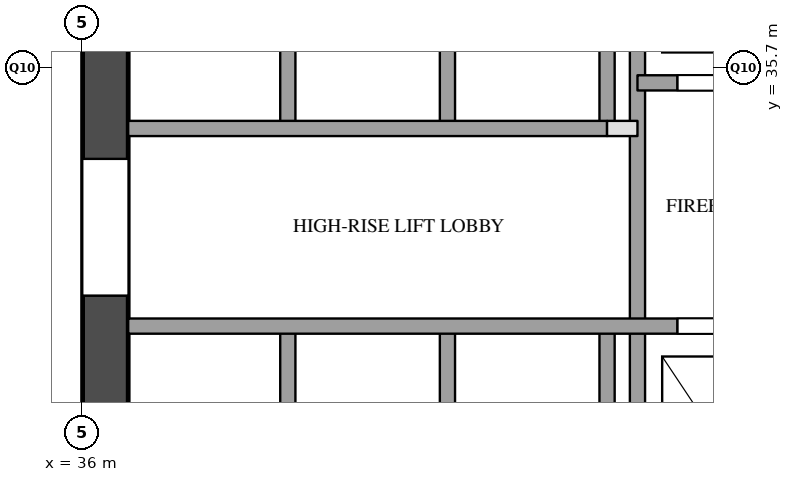
"""IFC4 building model, lengths in metres.
Left out: names, types, materials, properties, quantities, classifications, styles, units other than length and angle.
Written with IfcOpenShell. Run it as: python <this file> out.ifc"""

import sys

from ifc_helpers import new_model, si_unit, direction, frame, frame_2d, origin, place, context, subcontext, project, spatial, rectangle, extrude, element, fill, save


model = new_model("IFC4")
c1 = context("Model", 3, precision=1e-05, world=origin(), true_north=direction((0.0, 1.0)))
c2 = subcontext(c1, "Body", "Model", "MODEL_VIEW")
j1 = project(units=[si_unit("LENGTHUNIT", "METRE"), si_unit("PLANEANGLEUNIT", "RADIAN")], contexts=[c1])
p1 = place(None, origin())
s1 = spatial("IfcSite", under=j1, at=p1, CompositionType="ELEMENT")
p2 = place(p1, origin())
s2 = spatial("IfcBuilding", under=s1, at=p2, CompositionType="ELEMENT")
p3 = place(p2, frame((0.0, 0.0, 31.0)))
s3 = spatial("IfcBuildingStorey", under=s2, at=p3, CompositionType="ELEMENT", Elevation=31.0)
p4 = place(p3, frame((36.3, 29.1, 0.0), z_axis=(0.0, 0.0, 1.0), x_axis=(0.0, 1.0, 0.0)))
e1 = element("IfcWall", 1, at=p4, inside=s3, PredefinedType="SHEAR", context=c2, shape_type="SweptSolid", body=[
    extrude(rectangle(XDim=20.3, YDim=0.6, at=frame_2d((10.15, 0.0))), origin(), (0.0, 0.0, 1.0), 3.5),
])
p5 = place(p4, frame((3.6, 0.0, 0.0)))
e2 = element("IfcOpeningElement", 2, at=p5, cuts=e1, PredefinedType="OPENING", context=c2, shape_type="SweptSolid", body=[
    extrude(rectangle(XDim=1.8, YDim=2.1, at=frame_2d((0.9, 1.05))), frame((0.0, 0.31, 0.0), z_axis=(0.0, -1.0, 0.0), x_axis=(1.0, 0.0, 0.0)), (0.0, 0.0, 1.0), 0.62),
])
p6 = place(p4, frame((16.4, 0.0, 0.0)))
e3 = element("IfcOpeningElement", 3, at=p6, cuts=e1, PredefinedType="OPENING", context=c2, shape_type="SweptSolid", body=[
    extrude(rectangle(XDim=1.0, YDim=2.1, at=frame_2d((0.5, 1.05))), frame((0.0, 0.31, 0.0), z_axis=(0.0, -1.0, 0.0), x_axis=(1.0, 0.0, 0.0)), (0.0, 0.0, 1.0), 0.62),
])
p7 = place(p3, frame((38.7, 29.1, 0.0), z_axis=(0.0, 0.0, 1.0), x_axis=(0.0, 1.0, 0.0)))
e4 = element("IfcWall", 4, at=p7, inside=s3, PredefinedType="SOLIDWALL", context=c2, shape_type="SweptSolid", body=[
    extrude(rectangle(XDim=3.2, YDim=0.2, at=frame_2d((1.6, 0.0))), origin(), (0.0, 0.0, 1.0), 3.5),
])
p8 = place(p3, frame((38.7, 34.9, 0.0), z_axis=(0.0, 0.0, 1.0), x_axis=(0.0, 1.0, 0.0)))
e5 = element("IfcWall", 5, at=p8, inside=s3, PredefinedType="SOLIDWALL", context=c2, shape_type="SweptSolid", body=[
    extrude(rectangle(XDim=3.2, YDim=0.2, at=frame_2d((1.6, 0.0))), origin(), (0.0, 0.0, 1.0), 3.5),
])
p9 = place(p3, frame((40.8, 29.1, 0.0), z_axis=(0.0, 0.0, 1.0), x_axis=(0.0, 1.0, 0.0)))
e6 = element("IfcWall", 6, at=p9, inside=s3, PredefinedType="SOLIDWALL", context=c2, shape_type="SweptSolid", body=[
    extrude(rectangle(XDim=3.2, YDim=0.2, at=frame_2d((1.6, 0.0))), origin(), (0.0, 0.0, 1.0), 3.5),
])
p10 = place(p3, frame((40.8, 34.9, 0.0), z_axis=(0.0, 0.0, 1.0), x_axis=(0.0, 1.0, 0.0)))
e7 = element("IfcWall", 7, at=p10, inside=s3, PredefinedType="SOLIDWALL", context=c2, shape_type="SweptSolid", body=[
    extrude(rectangle(XDim=3.2, YDim=0.2, at=frame_2d((1.6, 0.0))), origin(), (0.0, 0.0, 1.0), 3.5),
])
p11 = place(p3, frame((42.9, 29.1, 0.0), z_axis=(0.0, 0.0, 1.0), x_axis=(0.0, 1.0, 0.0)))
e8 = element("IfcWall", 8, at=p11, inside=s3, PredefinedType="SOLIDWALL", context=c2, shape_type="SweptSolid", body=[
    extrude(rectangle(XDim=3.2, YDim=0.2, at=frame_2d((1.6, 0.0))), origin(), (0.0, 0.0, 1.0), 3.5),
])
p12 = place(p3, frame((42.9, 34.9, 0.0), z_axis=(0.0, 0.0, 1.0), x_axis=(0.0, 1.0, 0.0)))
e9 = element("IfcWall", 9, at=p12, inside=s3, PredefinedType="SOLIDWALL", context=c2, shape_type="SweptSolid", body=[
    extrude(rectangle(XDim=3.2, YDim=0.2, at=frame_2d((1.6, 0.0))), origin(), (0.0, 0.0, 1.0), 3.5),
])
p13 = place(p3, frame((43.3, 29.1, 0.0), z_axis=(0.0, 0.0, 1.0), x_axis=(0.0, 1.0, 0.0)))
e10 = element("IfcWall", 10, at=p13, inside=s3, PredefinedType="SOLIDWALL", context=c2, shape_type="SweptSolid", body=[
    extrude(rectangle(XDim=9.9, YDim=0.2, at=frame_2d((4.95, 0.0))), origin(), (0.0, 0.0, 1.0), 3.5),
])
p14 = place(p3, frame((36.6, 32.3, 0.0), z_axis=(0.0, 0.0, 1.0), x_axis=(1.0, 0.0, 0.0)))
e11 = element("IfcWall", 11, at=p14, inside=s3, PredefinedType="SOLIDWALL", context=c2, shape_type="SweptSolid", body=[
    extrude(rectangle(XDim=11.2, YDim=0.2, at=frame_2d((5.6, 0.0))), origin(), (0.0, 0.0, 1.0), 3.5),
])
p15 = place(p14, frame((7.225, 0.0, 0.0)))
e12 = element("IfcOpeningElement", 12, at=p15, cuts=e11, PredefinedType="OPENING", context=c2, shape_type="SweptSolid", body=[
    extrude(rectangle(XDim=1.2, YDim=2.1, at=frame_2d((0.6, 1.05))), frame((0.0, 0.11, 0.0), z_axis=(0.0, -1.0, 0.0), x_axis=(1.0, 0.0, 0.0)), (0.0, 0.0, 1.0), 0.22),
])
p16 = place(p14, frame((9.475, 0.0, 0.0)))
e13 = element("IfcOpeningElement", 13, at=p16, cuts=e11, PredefinedType="OPENING", context=c2, shape_type="SweptSolid", body=[
    extrude(rectangle(XDim=1.2, YDim=2.1, at=frame_2d((0.6, 1.05))), frame((0.0, 0.11, 0.0), z_axis=(0.0, -1.0, 0.0), x_axis=(1.0, 0.0, 0.0)), (0.0, 0.0, 1.0), 0.22),
])
p17 = place(p3, frame((42.9, 34.9, 0.0), z_axis=(0.0, 0.0, 1.0), x_axis=(1.0, 0.0, 0.0)))
e14 = element("IfcWall", 14, at=p17, inside=s3, PredefinedType="PARTITIONING", context=c2, shape_type="SweptSolid", body=[
    extrude(rectangle(XDim=0.4, YDim=0.2, at=frame_2d((0.2, 0.0))), origin(), (0.0, 0.0, 1.0), 3.5),
])
p18 = place(p3, frame((36.6, 34.9, 0.0), z_axis=(0.0, 0.0, 1.0), x_axis=(1.0, 0.0, 0.0)))
e15 = element("IfcWall", 15, at=p18, inside=s3, PredefinedType="SOLIDWALL", context=c2, shape_type="SweptSolid", body=[
    extrude(rectangle(XDim=6.3, YDim=0.2, at=frame_2d((3.15, 0.0))), origin(), (0.0, 0.0, 1.0), 3.5),
])
p19 = place(p3, frame((43.3, 35.5, 0.0), z_axis=(0.0, 0.0, 1.0), x_axis=(1.0, 0.0, 0.0)))
e16 = element("IfcWall", 16, at=p19, inside=s3, PredefinedType="SOLIDWALL", context=c2, shape_type="SweptSolid", body=[
    extrude(rectangle(XDim=4.5, YDim=0.2, at=frame_2d((2.25, 0.0))), origin(), (0.0, 0.0, 1.0), 3.5),
])
p20 = place(p19, frame((0.525, 0.0, 0.0)))
e17 = element("IfcOpeningElement", 17, at=p20, cuts=e16, PredefinedType="OPENING", context=c2, shape_type="SweptSolid", body=[
    extrude(rectangle(XDim=1.2, YDim=2.1, at=frame_2d((0.6, 1.05))), frame((0.0, 0.11, 0.0), z_axis=(0.0, -1.0, 0.0), x_axis=(1.0, 0.0, 0.0)), (0.0, 0.0, 1.0), 0.22),
])
p21 = place(p19, frame((3.025, 0.0, 0.0)))
e18 = element("IfcOpeningElement", 18, at=p21, cuts=e16, PredefinedType="OPENING", context=c2, shape_type="SweptSolid", body=[
    extrude(rectangle(XDim=0.7, YDim=2.1, at=frame_2d((0.35, 1.05))), frame((0.0, 0.11, 0.0), z_axis=(0.0, -1.0, 0.0), x_axis=(1.0, 0.0, 0.0)), (0.0, 0.0, 1.0), 0.22),
])
p22 = place(p15, origin())
e19 = element("IfcDoor", 19, at=p22, inside=s3, OperationType="SLIDING_TO_LEFT", PredefinedType="DOOR", context=c2, shape_type="SweptSolid", body=[
    extrude(rectangle(XDim=1.2, YDim=2.1, at=frame_2d((0.6, 1.05))), frame((0.0, 0.025, 0.0), z_axis=(0.0, -1.0, 0.0), x_axis=(1.0, 0.0, 0.0)), (0.0, 0.0, 1.0), 0.05),
])
fill(e12, e19)
p23 = place(p20, origin())
e20 = element("IfcDoor", 20, at=p23, inside=s3, OperationType="SLIDING_TO_LEFT", PredefinedType="DOOR", context=c2, shape_type="SweptSolid", body=[
    extrude(rectangle(XDim=1.2, YDim=2.1, at=frame_2d((0.6, 1.05))), frame((0.0, 0.025, 0.0), z_axis=(0.0, -1.0, 0.0), x_axis=(1.0, 0.0, 0.0)), (0.0, 0.0, 1.0), 0.05),
])
fill(e17, e20)
p24 = place(p5, origin())
e21 = element("IfcDoor", 21, at=p24, inside=s3, OperationType="DOUBLE_DOOR_SINGLE_SWING", PredefinedType="DOOR", context=c2, shape_type="SweptSolid", body=[
    extrude(rectangle(XDim=1.8, YDim=2.1, at=frame_2d((0.9, 1.05))), frame((0.0, 0.025, 0.0), z_axis=(0.0, -1.0, 0.0), x_axis=(1.0, 0.0, 0.0)), (0.0, 0.0, 1.0), 0.05),
])
fill(e2, e21)
save(model, sys.argv[1])
